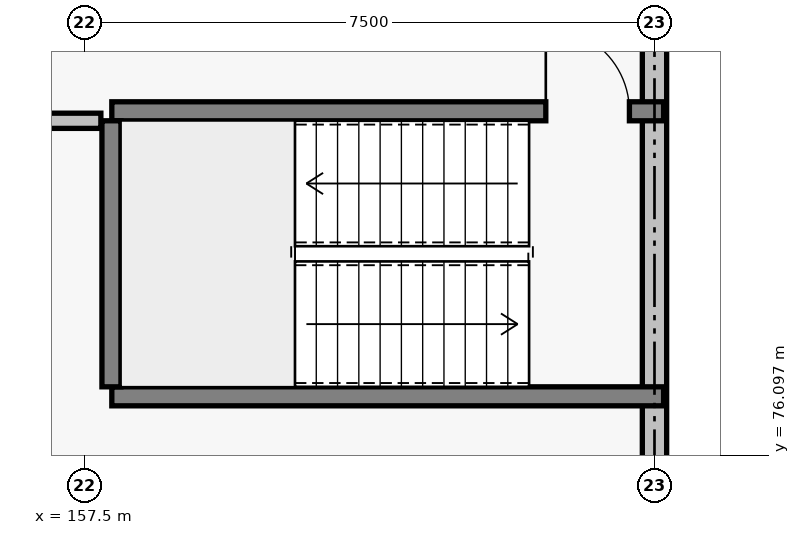
"""IFC4 building model, lengths in metres.
Left out: names, types, materials, properties, quantities, classifications, styles, units other than length and angle.
Written with IfcOpenShell. Run it as: python <this file> out.ifc"""

import sys

from ifc_helpers import new_model, si_unit, direction, frame, frame_2d, origin, place, context, subcontext, project, spatial, rectangle, extrude, element, fill, save


model = new_model("IFC4")
c1 = context("Model", 3, precision=1e-05, world=origin(), true_north=direction((0.0, 1.0)))
c2 = subcontext(c1, "Body", "Model", "MODEL_VIEW")
j1 = project(units=[si_unit("LENGTHUNIT", "METRE"), si_unit("PLANEANGLEUNIT", "RADIAN")], contexts=[c1])
p1 = place(None, origin())
s1 = spatial("IfcSite", under=j1, at=p1, CompositionType="ELEMENT")
p2 = place(p1, origin())
s2 = spatial("IfcBuilding", under=s1, at=p2, CompositionType="ELEMENT")
p3 = place(p2, frame((0.0, 0.0, 9.0)))
s3 = spatial("IfcBuildingStorey", under=s2, at=p3, CompositionType="ELEMENT", Elevation=9.0)
p4 = place(p3, frame((165.0, 75.305, 0.0), z_axis=(0.0, 0.0, 1.0), x_axis=(0.0, 1.0, 0.0)))
e1 = element("IfcWall", 1, at=p4, inside=s3, PredefinedType="SOLIDWALL", context=c2, shape_type="SweptSolid", body=[
    extrude(rectangle(XDim=6.89, YDim=0.32, at=frame_2d((3.445, 0.0))), origin(), (0.0, 0.0, 1.0), 2.82),
])
p5 = place(p3, frame((157.86, 76.875, 0.0), z_axis=(0.0, 0.0, 1.0), x_axis=(1.0, 0.0, 0.0)))
e2 = element("IfcWall", 2, at=p5, inside=s3, PredefinedType="SOLIDWALL", context=c2, shape_type="SweptSolid", body=[
    extrude(rectangle(XDim=7.26, YDim=0.25, at=frame_2d((3.63, 0.0))), origin(), (0.0, 0.0, 1.0), 3.92),
])
p6 = place(p3, frame((157.86, 80.625, 0.0), z_axis=(0.0, 0.0, 1.0), x_axis=(1.0, 0.0, 0.0)))
e3 = element("IfcWall", 3, at=p6, inside=s3, PredefinedType="SOLIDWALL", context=c2, shape_type="SweptSolid", body=[
    extrude(rectangle(XDim=7.26, YDim=0.25, at=frame_2d((3.63, 0.0))), origin(), (0.0, 0.0, 1.0), 3.92),
])
p7 = place(p6, frame((5.71, 0.0, 0.0)))
e4 = element("IfcOpeningElement", 4, at=p7, cuts=e3, PredefinedType="OPENING", context=c2, shape_type="SweptSolid", body=[
    extrude(rectangle(XDim=1.1, YDim=2.15, at=frame_2d((0.55, 1.075))), frame((0.0, 0.135, 0.0), z_axis=(0.0, -1.0, 0.0), x_axis=(1.0, 0.0, 0.0)), (0.0, 0.0, 1.0), 0.27),
])
p8 = place(p3, frame((157.855, 77.0, 0.0), z_axis=(0.0, 0.0, 1.0), x_axis=(0.0, 1.0, 0.0)))
e5 = element("IfcWall", 5, at=p8, inside=s3, PredefinedType="SOLIDWALL", context=c2, shape_type="SweptSolid", body=[
    extrude(rectangle(XDim=3.5, YDim=0.25, at=frame_2d((1.75, 0.0))), origin(), (0.0, 0.0, 1.0), 3.92),
])
p9 = place(p3, frame((154.5, 80.5, 0.0), z_axis=(0.0, 0.0, 1.0), x_axis=(1.0, 0.0, 0.0)))
e6 = element("IfcWall", 6, at=p9, inside=s3, PredefinedType="PARTITIONING", context=c2, shape_type="SweptSolid", body=[
    extrude(rectangle(XDim=3.216, YDim=0.2, at=frame_2d((1.608, 0.0))), origin(), (0.0, 0.0, 1.0), 3.22),
])
p10 = place(p7, origin())
e7 = element("IfcDoor", 7, at=p10, inside=s3, OperationType="SINGLE_SWING_LEFT", PredefinedType="DOOR", context=c2, shape_type="SweptSolid", body=[
    extrude(rectangle(XDim=1.1, YDim=2.15, at=frame_2d((0.55, 1.075))), frame((0.0, 0.025, 0.0), z_axis=(0.0, -1.0, 0.0), x_axis=(1.0, 0.0, 0.0)), (0.0, 0.0, 1.0), 0.05),
])
fill(e4, e7)
save(model, sys.argv[1])
